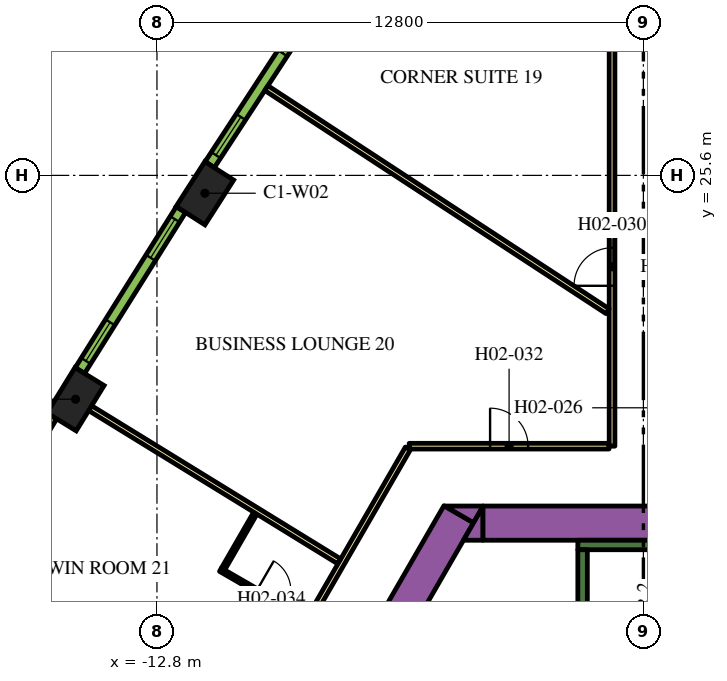
"""IFC4 building model, lengths in metres.
Left out: names, types, materials, properties, quantities, classifications, styles, units other than length and angle.
Written with IfcOpenShell. Run it as: python <this file> out.ifc"""

import sys

from ifc_helpers import new_model, si_unit, direction, frame, frame_2d, origin, origin_2d, place, context, subcontext, project, spatial, polyline, rectangle, outline, extrude, element, fill, save


model = new_model("IFC4")
c1 = context("Model", 3, precision=1e-05, world=origin(), true_north=direction((0.0, 1.0)))
c2 = subcontext(c1, "Body", "Model", "MODEL_VIEW")
j1 = project(units=[si_unit("LENGTHUNIT", "METRE"), si_unit("PLANEANGLEUNIT", "RADIAN")], contexts=[c1])
p1 = place(None, origin())
s1 = spatial("IfcSite", under=j1, at=p1, CompositionType="ELEMENT")
p2 = place(p1, origin())
s2 = spatial("IfcBuilding", under=s1, at=p2, CompositionType="ELEMENT")
p3 = place(p2, frame((0.0, 0.0, 43.2)))
s3 = spatial("IfcBuildingStorey", under=s2, at=p3, CompositionType="ELEMENT", Elevation=43.2)
for number, where, z_axis, x_axis in (
    (1, (-11.539, 25.131, 0.0), (0.0, 0.0, 1.0), (-0.539, -0.842, 0.0)),
    (2, (-14.942, 19.71, 0.0), (0.0, 0.0, 1.0), (-0.524, -0.852, 0.0)),
):
    element("IfcColumn", number, at=place(p3, frame(where, z_axis=z_axis, x_axis=x_axis)), inside=s3, PredefinedType="COLUMN", context=c2, shape_type="SweptSolid", body=[
        extrude(rectangle(XDim=1.4, YDim=0.9, at=origin_2d()), origin(), (0.0, 0.0, 1.0), 3.9),
    ])
p4 = place(p3, frame((-15.36, -1.503, 0.0), z_axis=(0.0, 0.0, 1.0), x_axis=(0.50000389221, 0.866023156604, 0.0)))
e3 = element("IfcWall", 3, at=p4, inside=s3, PredefinedType="SOLIDWALL", context=c2, shape_type="SweptSolid", body=[
    extrude(rectangle(XDim=21.0, YDim=0.9, at=frame_2d((10.5, 0.0))), origin(), (0.0, 0.0, 1.0), 3.9),
])
p5 = place(p3, origin())
e4 = element("IfcWall", 4, at=p5, inside=s3, PredefinedType="SOLIDWALL", context=c2, shape_type="SweptSolid", body=[
    extrude(outline(polyline([(-4.215, 16.9), (-4.469, 16.46), (-5.231, 16.9), (-4.215, 16.9)])), origin(), (0.0, 0.0, 1.0), 3.9),
])
p6 = place(p3, frame((-4.224, 16.45, 0.0), z_axis=(0.0, 0.0, 1.0), x_axis=(1.0, 0.0, 0.0)))
e5 = element("IfcWall", 5, at=p6, inside=s3, PredefinedType="SOLIDWALL", context=c2, shape_type="SweptSolid", body=[
    extrude(rectangle(XDim=9.488, YDim=0.9, at=frame_2d((4.744, 0.0))), origin(), (0.0, 0.0, 1.0), 3.9),
])
e6 = element("IfcWall", 6, at=p5, inside=s3, PredefinedType="SOLIDWALL", context=c2, shape_type="SweptSolid", body=[
    extrude(outline(polyline([(-4.734, 16.0), (-4.226, 16.88), (-4.226, 16.0), (-4.734, 16.0)])), origin(), (0.0, 0.0, 1.0), 3.9),
])
p7 = place(p3, frame((-1.725, 15.875, 0.0), z_axis=(0.0, 0.0, 1.0), x_axis=(1.0, 0.0, 0.0)))
e7 = element("IfcWall", 7, at=p7, inside=s3, PredefinedType="SOLIDWALL", context=c2, shape_type="SweptSolid", body=[
    extrude(rectangle(XDim=3.45, YDim=0.25, at=frame_2d((1.725, 0.0))), origin(), (0.0, 0.0, 1.0), 3.9),
])
p8 = place(p3, frame((-1.6, 8.7, 0.0), z_axis=(0.0, 0.0, 1.0), x_axis=(0.0, 1.0, 0.0)))
e8 = element("IfcWall", 8, at=p8, inside=s3, PredefinedType="SOLIDWALL", context=c2, shape_type="SweptSolid", body=[
    extrude(rectangle(XDim=7.05, YDim=0.25, at=frame_2d((3.525, 0.0))), origin(), (0.0, 0.0, 1.0), 3.9),
])
p9 = place(p3, frame((-0.825, 18.475, 0.0), z_axis=(0.0, 0.0, 1.0), x_axis=(0.0, 1.0, 0.0)))
e9 = element("IfcWall", 9, at=p9, inside=s3, PredefinedType="PARTITIONING", context=c2, shape_type="SweptSolid", body=[
    extrude(rectangle(XDim=16.224, YDim=0.15, at=frame_2d((8.112, 0.0))), origin(), (0.0, 0.0, 1.0), 2.75),
])
p10 = place(p9, frame((4.22, 0.0, 0.0)))
e10 = element("IfcOpeningElement", 10, at=p10, cuts=e9, PredefinedType="OPENING", context=c2, shape_type="SweptSolid", body=[
    extrude(rectangle(XDim=1.0, YDim=2.1, at=frame_2d((0.5, 1.05))), frame((0.0, 0.085, 0.0), z_axis=(0.0, -1.0, 0.0), x_axis=(1.0, 0.0, 0.0)), (0.0, 0.0, 1.0), 0.17),
])
p11 = place(p3, frame((-6.163, 18.475, 0.0), z_axis=(0.0, 0.0, 1.0), x_axis=(1.0, 0.0, 0.0)))
e11 = element("IfcWall", 11, at=p11, inside=s3, PredefinedType="PARTITIONING", context=c2, shape_type="SweptSolid", body=[
    extrude(rectangle(XDim=5.258, YDim=0.15, at=frame_2d((2.629, 0.0))), origin(), (0.0, 0.0, 1.0), 2.75),
])
p12 = place(p11, frame((2.129, 0.0, 0.0)))
e12 = element("IfcOpeningElement", 12, at=p12, cuts=e11, PredefinedType="OPENING", context=c2, shape_type="SweptSolid", body=[
    extrude(rectangle(XDim=1.0, YDim=2.1, at=frame_2d((0.5, 1.05))), frame((0.0, 0.085, 0.0), z_axis=(0.0, -1.0, 0.0), x_axis=(1.0, 0.0, 0.0)), (0.0, 0.0, 1.0), 0.17),
])
p13 = place(p3, frame((-19.081, -3.9, 0.0), z_axis=(0.0, 0.0, 1.0), x_axis=(0.499998313975, 0.866026377209, 0.0)))
e13 = element("IfcWall", 13, at=p13, inside=s3, PredefinedType="PARTITIONING", context=c2, shape_type="SweptSolid", body=[
    extrude(rectangle(XDim=25.766, YDim=0.15, at=frame_2d((12.883, 0.0))), origin(), (0.0, 0.0, 1.0), 2.75),
])
p14 = place(p13, frame((16.196, 0.0, 0.0)))
e14 = element("IfcOpeningElement", 14, at=p14, cuts=e13, PredefinedType="OPENING", context=c2, shape_type="SweptSolid", body=[
    extrude(rectangle(XDim=1.0, YDim=2.1, at=frame_2d((0.5, 1.05))), frame((0.0, 0.085, 0.0), z_axis=(0.0, -1.0, 0.0), x_axis=(1.0, 0.0, 0.0)), (0.0, 0.0, 1.0), 0.17),
])
p15 = place(p13, frame((14.889, 0.0, 0.0)))
e15 = element("IfcOpeningElement", 15, at=p15, cuts=e13, PredefinedType="OPENING", context=c2, shape_type="SweptSolid", body=[
    extrude(rectangle(XDim=1.0, YDim=2.1, at=frame_2d((0.5, 1.05))), frame((0.0, 0.085, 0.0), z_axis=(0.0, -1.0, 0.0), x_axis=(1.0, 0.0, 0.0)), (0.0, 0.0, 1.0), 0.17),
])
p16 = place(p13, frame((3.698, 0.0, 0.0)))
e16 = element("IfcOpeningElement", 16, at=p16, cuts=e13, PredefinedType="OPENING", context=c2, shape_type="SweptSolid", body=[
    extrude(rectangle(XDim=1.1, YDim=2.1, at=frame_2d((0.55, 1.05))), frame((0.0, 0.085, 0.0), z_axis=(0.0, -1.0, 0.0), x_axis=(1.0, 0.0, 0.0)), (0.0, 0.0, 1.0), 0.17),
])
p17 = place(p13, frame((2.392, 0.0, 0.0)))
e17 = element("IfcOpeningElement", 17, at=p17, cuts=e13, PredefinedType="OPENING", context=c2, shape_type="SweptSolid", body=[
    extrude(rectangle(XDim=1.0, YDim=2.1, at=frame_2d((0.5, 1.05))), frame((0.0, 0.085, 0.0), z_axis=(0.0, -1.0, 0.0), x_axis=(1.0, 0.0, 0.0)), (0.0, 0.0, 1.0), 0.17),
])
p18 = place(p3, frame((-14.558, 19.475, 0.0), z_axis=(0.0, 0.0, 1.0), x_axis=(0.851829455142, -0.523819223925, 0.0)))
e18 = element("IfcWall", 18, at=p18, inside=s3, PredefinedType="PARTITIONING", context=c2, shape_type="SweptSolid", body=[
    extrude(rectangle(XDim=7.688, YDim=0.15, at=frame_2d((3.844, 0.0))), origin(), (0.0, 0.0, 1.0), 2.75),
])
p19 = place(p3, frame((-9.922, 27.896, 0.0), z_axis=(0.0, 0.0, 1.0), x_axis=(0.836970816595, -0.547247523675, 0.0)))
e19 = element("IfcWall", 19, at=p19, inside=s3, PredefinedType="PARTITIONING", context=c2, shape_type="SweptSolid", body=[
    extrude(rectangle(XDim=10.729, YDim=0.15, at=frame_2d((5.364, 0.0))), origin(), (0.0, 0.0, 1.0), 2.75),
])
p20 = place(p3, frame((-11.129, 15.224, 0.0), z_axis=(0.0, 0.0, 1.0), x_axis=(0.866021400173, -0.500006934395, 0.0)))
e20 = element("IfcWall", 20, at=p20, inside=s3, PredefinedType="PARTITIONING", context=c2, shape_type="SweptSolid", body=[
    extrude(rectangle(XDim=2.6, YDim=0.1, at=frame_2d((1.3, 0.0))), origin(), (0.0, 0.0, 1.0), 2.75),
])
p21 = place(p20, frame((1.1, 0.0, 0.0)))
e21 = element("IfcOpeningElement", 21, at=p21, cuts=e20, PredefinedType="OPENING", context=c2, shape_type="SweptSolid", body=[
    extrude(rectangle(XDim=0.9, YDim=2.1, at=frame_2d((0.45, 1.05))), frame((0.0, 0.06, 0.0), z_axis=(0.0, -1.0, 0.0), x_axis=(1.0, 0.0, 0.0)), (0.0, 0.0, 1.0), 0.12),
])
p22 = place(p3, frame((-11.061, 15.242, 0.0), z_axis=(0.0, 0.0, 1.0), x_axis=(0.499976720371, 0.866038843867, 0.0)))
e22 = element("IfcWall", 22, at=p22, inside=s3, PredefinedType="PARTITIONING", context=c2, shape_type="SweptSolid", body=[
    extrude(rectangle(XDim=1.69, YDim=0.1, at=frame_2d((0.845, 0.0))), origin(), (0.0, 0.0, 1.0), 2.75),
])
p23 = place(p3, frame((-8.676, 30.068, 0.0), z_axis=(0.0, 0.0, 1.0), x_axis=(-0.547204617628, -0.836998868845, 0.0)))
e23 = element("IfcWall", 23, at=p23, inside=s3, PredefinedType="SOLIDWALL", context=c2, shape_type="SweptSolid", body=[
    extrude(rectangle(XDim=4.998, YDim=0.29, at=frame_2d((2.499, 0.0))), origin(), (0.0, 0.0, 1.0), 3.65),
])
p24 = place(p23, frame((0.297, 0.0, 0.9)))
e24 = element("IfcOpeningElement", 24, at=p24, cuts=e23, PredefinedType="OPENING", context=c2, shape_type="SweptSolid", body=[
    extrude(rectangle(XDim=1.2, YDim=2.15, at=frame_2d((0.6, 1.075))), frame((0.0, 0.155, 0.0), z_axis=(0.0, -1.0, 0.0), x_axis=(1.0, 0.0, 0.0)), (0.0, 0.0, 1.0), 0.31),
])
p25 = place(p23, frame((3.501, 0.0, 0.9)))
e25 = element("IfcOpeningElement", 25, at=p25, cuts=e23, PredefinedType="OPENING", context=c2, shape_type="SweptSolid", body=[
    extrude(rectangle(XDim=1.2, YDim=2.15, at=frame_2d((0.6, 1.075))), frame((0.0, 0.155, 0.0), z_axis=(0.0, -1.0, 0.0), x_axis=(1.0, 0.0, 0.0)), (0.0, 0.0, 1.0), 0.31),
])
p26 = place(p3, frame((-12.17, 24.699, 0.0), z_axis=(0.0, 0.0, 1.0), x_axis=(-0.531688286542, -0.846940119462, 0.0)))
e26 = element("IfcWall", 26, at=p26, inside=s3, PredefinedType="SOLIDWALL", context=c2, shape_type="SweptSolid", body=[
    extrude(rectangle(XDim=4.998, YDim=0.29, at=frame_2d((2.499, 0.0))), origin(), (0.0, 0.0, 1.0), 3.65),
])
p27 = place(p26, frame((0.297, 0.0, 0.9)))
e27 = element("IfcOpeningElement", 27, at=p27, cuts=e26, PredefinedType="OPENING", context=c2, shape_type="SweptSolid", body=[
    extrude(rectangle(XDim=1.2, YDim=2.15, at=frame_2d((0.6, 1.075))), frame((0.0, 0.155, 0.0), z_axis=(0.0, -1.0, 0.0), x_axis=(1.0, 0.0, 0.0)), (0.0, 0.0, 1.0), 0.31),
])
p28 = place(p26, frame((3.501, 0.0, 0.9)))
e28 = element("IfcOpeningElement", 28, at=p28, cuts=e26, PredefinedType="OPENING", context=c2, shape_type="SweptSolid", body=[
    extrude(rectangle(XDim=1.2, YDim=2.15, at=frame_2d((0.6, 1.075))), frame((0.0, 0.155, 0.0), z_axis=(0.0, -1.0, 0.0), x_axis=(1.0, 0.0, 0.0)), (0.0, 0.0, 1.0), 0.31),
])
p29 = place(p3, frame((-15.564, 19.267, 0.0), z_axis=(0.0, 0.0, 1.0), x_axis=(-0.515938796285, -0.856625448191, 0.0)))
e29 = element("IfcWall", 29, at=p29, inside=s3, PredefinedType="SOLIDWALL", context=c2, shape_type="SweptSolid", body=[
    extrude(rectangle(XDim=4.998, YDim=0.29, at=frame_2d((2.499, 0.0))), origin(), (0.0, 0.0, 1.0), 3.65),
])
p30 = place(p29, frame((0.297, 0.0, 0.9)))
e30 = element("IfcOpeningElement", 30, at=p30, cuts=e29, PredefinedType="OPENING", context=c2, shape_type="SweptSolid", body=[
    extrude(rectangle(XDim=1.2, YDim=2.15, at=frame_2d((0.6, 1.075))), frame((0.0, 0.155, 0.0), z_axis=(0.0, -1.0, 0.0), x_axis=(1.0, 0.0, 0.0)), (0.0, 0.0, 1.0), 0.31),
])
p31 = place(p29, frame((3.501, 0.0, 0.9)))
e31 = element("IfcOpeningElement", 31, at=p31, cuts=e29, PredefinedType="OPENING", context=c2, shape_type="SweptSolid", body=[
    extrude(rectangle(XDim=1.2, YDim=2.15, at=frame_2d((0.6, 1.075))), frame((0.0, 0.155, 0.0), z_axis=(0.0, -1.0, 0.0), x_axis=(1.0, 0.0, 0.0)), (0.0, 0.0, 1.0), 0.31),
])
p32 = place(p10, origin())
e32 = element("IfcDoor", 32, at=p32, inside=s3, OperationType="SINGLE_SWING_LEFT", PredefinedType="DOOR", context=c2, shape_type="SweptSolid", body=[
    extrude(rectangle(XDim=1.0, YDim=2.1, at=frame_2d((0.5, 1.05))), frame((0.0, 0.025, 0.0), z_axis=(0.0, -1.0, 0.0), x_axis=(1.0, 0.0, 0.0)), (0.0, 0.0, 1.0), 0.05),
])
fill(e10, e32)
p33 = place(p12, origin())
e33 = element("IfcDoor", 33, at=p33, inside=s3, OperationType="SINGLE_SWING_RIGHT", PredefinedType="DOOR", context=c2, shape_type="SweptSolid", body=[
    extrude(rectangle(XDim=1.0, YDim=2.1, at=frame_2d((0.5, 1.05))), frame((0.0, 0.025, 0.0), z_axis=(0.0, -1.0, 0.0), x_axis=(1.0, 0.0, 0.0)), (0.0, 0.0, 1.0), 0.05),
])
fill(e12, e33)
p34 = place(p21, origin())
e34 = element("IfcDoor", 34, at=p34, inside=s3, OperationType="SINGLE_SWING_RIGHT", PredefinedType="DOOR", context=c2, shape_type="SweptSolid", body=[
    extrude(rectangle(XDim=0.9, YDim=2.1, at=frame_2d((0.45, 1.05))), frame((0.0, 0.025, 0.0), z_axis=(0.0, -1.0, 0.0), x_axis=(1.0, 0.0, 0.0)), (0.0, 0.0, 1.0), 0.05),
])
fill(e21, e34)
p35 = place(p24, origin())
e35 = element("IfcWindow", 35, at=p35, inside=s3, PartitioningType="DOUBLE_PANEL_VERTICAL", PredefinedType="WINDOW", context=c2, shape_type="SweptSolid", body=[
    extrude(rectangle(XDim=1.2, YDim=2.15, at=frame_2d((0.6, 1.075))), frame((0.0, 0.015, 0.0), z_axis=(0.0, -1.0, 0.0), x_axis=(1.0, 0.0, 0.0)), (0.0, 0.0, 1.0), 0.06),
])
fill(e24, e35)
p36 = place(p25, origin())
e36 = element("IfcWindow", 36, at=p36, inside=s3, PartitioningType="DOUBLE_PANEL_VERTICAL", PredefinedType="WINDOW", context=c2, shape_type="SweptSolid", body=[
    extrude(rectangle(XDim=1.2, YDim=2.15, at=frame_2d((0.6, 1.075))), frame((0.0, 0.015, 0.0), z_axis=(0.0, -1.0, 0.0), x_axis=(1.0, 0.0, 0.0)), (0.0, 0.0, 1.0), 0.06),
])
fill(e25, e36)
p37 = place(p27, origin())
e37 = element("IfcWindow", 37, at=p37, inside=s3, PartitioningType="DOUBLE_PANEL_VERTICAL", PredefinedType="WINDOW", context=c2, shape_type="SweptSolid", body=[
    extrude(rectangle(XDim=1.2, YDim=2.15, at=frame_2d((0.6, 1.075))), frame((0.0, 0.015, 0.0), z_axis=(0.0, -1.0, 0.0), x_axis=(1.0, 0.0, 0.0)), (0.0, 0.0, 1.0), 0.06),
])
fill(e27, e37)
p38 = place(p28, origin())
e38 = element("IfcWindow", 38, at=p38, inside=s3, PartitioningType="DOUBLE_PANEL_VERTICAL", PredefinedType="WINDOW", context=c2, shape_type="SweptSolid", body=[
    extrude(rectangle(XDim=1.2, YDim=2.15, at=frame_2d((0.6, 1.075))), frame((0.0, 0.015, 0.0), z_axis=(0.0, -1.0, 0.0), x_axis=(1.0, 0.0, 0.0)), (0.0, 0.0, 1.0), 0.06),
])
fill(e28, e38)
save(model, sys.argv[1])
